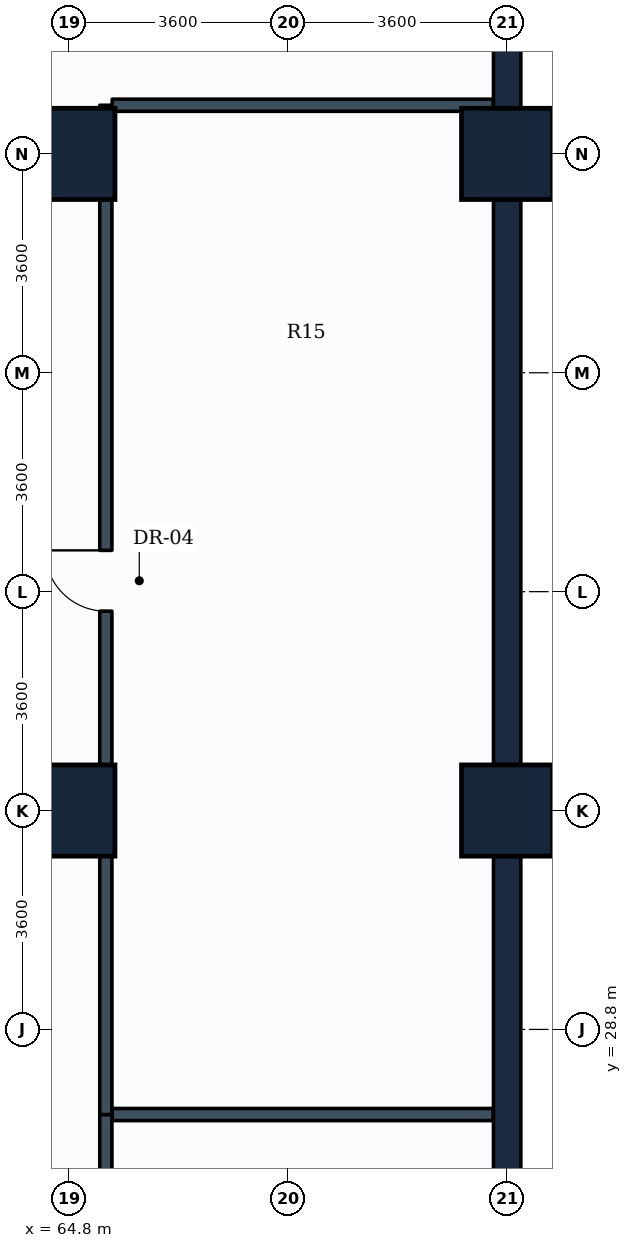
"""IFC4 building model, lengths in metres.
Left out: names, types, materials, properties, quantities, classifications, styles, units other than length and angle.
Written with IfcOpenShell. Run it as: python <this file> out.ifc"""

import sys

from ifc_helpers import new_model, si_unit, direction, frame, frame_2d, origin, origin_2d, place, context, subcontext, project, spatial, rectangle, extrude, element, fill, save


model = new_model("IFC4")
c1 = context("Model", 3, precision=1e-05, world=origin(), true_north=direction((0.0, 1.0)))
c2 = subcontext(c1, "Body", "Model", "MODEL_VIEW")
j1 = project(units=[si_unit("LENGTHUNIT", "METRE"), si_unit("PLANEANGLEUNIT", "RADIAN")], contexts=[c1])
p1 = place(None, origin())
s1 = spatial("IfcSite", under=j1, at=p1, CompositionType="ELEMENT")
p2 = place(p1, origin())
s2 = spatial("IfcBuilding", under=s1, at=p2, CompositionType="ELEMENT")
p3 = place(p2, frame((0.0, 0.0, -9.6)))
s3 = spatial("IfcBuildingStorey", under=s2, at=p3, CompositionType="ELEMENT", Elevation=-9.6)
for number, where, z_axis, x_axis in (
    (1, (64.8, 32.4, 0.0), (0.0, 0.0, 1.0), (1.0, 0.0, 0.0)),
    (2, (64.8, 43.2, 0.0), (0.0, 0.0, 1.0), (1.0, 0.0, 0.0)),
    (3, (72.0, 32.4, 0.0), (0.0, 0.0, 1.0), (1.0, 0.0, 0.0)),
    (4, (72.0, 43.2, 0.0), (0.0, 0.0, 1.0), (1.0, 0.0, 0.0)),
):
    element("IfcColumn", number, at=place(p3, frame(where, z_axis=z_axis, x_axis=x_axis)), inside=s3, PredefinedType="COLUMN", context=c2, shape_type="SweptSolid", body=[
        extrude(rectangle(XDim=1.5, YDim=1.5, at=origin_2d()), origin(), (0.0, 0.0, 1.0), 4.8),
    ])
p4 = place(p3, frame((72.0, 0.0, 0.0), z_axis=(0.0, 0.0, 1.0), x_axis=(0.0, 1.0, 0.0)))
e5 = element("IfcWall", 5, at=p4, inside=s3, PredefinedType="SOLIDWALL", context=c2, shape_type="SweptSolid", body=[
    extrude(rectangle(XDim=50.4, YDim=0.45, at=frame_2d((25.2, 0.0))), origin(), (0.0, 0.0, 1.0), 4.45),
])
p5 = place(p3, frame((65.4, 10.904, 0.0), z_axis=(0.0, 0.0, 1.0), x_axis=(0.0, 1.0, 0.0)))
e6 = element("IfcWall", 6, at=p5, inside=s3, PredefinedType="PARTITIONING", context=c2, shape_type="SweptSolid", body=[
    extrude(rectangle(XDim=16.496, YDim=0.2, at=frame_2d((8.248, 0.0))), origin(), (0.0, 0.0, 1.0), 3.63),
])
p6 = place(p5, frame((6.419, 0.0, 0.0)))
e7 = element("IfcOpeningElement", 7, at=p6, cuts=e6, PredefinedType="OPENING", context=c2, shape_type="SweptSolid", body=[
    extrude(rectangle(XDim=1.0, YDim=2.1, at=frame_2d((0.5, 1.05))), frame((0.0, 0.11, 0.0), z_axis=(0.0, -1.0, 0.0), x_axis=(1.0, 0.0, 0.0)), (0.0, 0.0, 1.0), 0.22),
])
p7 = place(p3, frame((65.4, 27.4, 0.0), z_axis=(0.0, 0.0, 1.0), x_axis=(0.0, 1.0, 0.0)))
e8 = element("IfcWall", 8, at=p7, inside=s3, PredefinedType="PARTITIONING", context=c2, shape_type="SweptSolid", body=[
    extrude(rectangle(XDim=16.6, YDim=0.2, at=frame_2d((8.3, 0.0))), origin(), (0.0, 0.0, 1.0), 3.63),
])
p8 = place(p7, frame((8.279, 0.0, 0.0)))
e9 = element("IfcOpeningElement", 9, at=p8, cuts=e8, PredefinedType="OPENING", context=c2, shape_type="SweptSolid", body=[
    extrude(rectangle(XDim=1.0, YDim=2.1, at=frame_2d((0.5, 1.05))), frame((0.0, 0.11, 0.0), z_axis=(0.0, -1.0, 0.0), x_axis=(1.0, 0.0, 0.0)), (0.0, 0.0, 1.0), 0.22),
])
for number, where, z_axis, x_axis in (
    (10, (65.504, 27.4, 0.0), (0.0, 0.0, 1.0), (1.0, 0.0, 0.0)),
    (11, (65.504, 44.0, 0.0), (0.0, 0.0, 1.0), (1.0, 0.0, 0.0)),
):
    element("IfcWall", number, at=place(p3, frame(where, z_axis=z_axis, x_axis=x_axis)), inside=s3, PredefinedType="PARTITIONING", context=c2, shape_type="SweptSolid", body=[
        extrude(rectangle(XDim=6.267, YDim=0.2, at=frame_2d((3.134, 0.0))), origin(), (0.0, 0.0, 1.0), 3.93),
    ])
p9 = place(p8, origin())
e12 = element("IfcDoor", 12, at=p9, inside=s3, OperationType="SINGLE_SWING_RIGHT", PredefinedType="DOOR", context=c2, shape_type="SweptSolid", body=[
    extrude(rectangle(XDim=1.0, YDim=2.1, at=frame_2d((0.5, 1.05))), frame((0.0, 0.025, 0.0), z_axis=(0.0, -1.0, 0.0), x_axis=(1.0, 0.0, 0.0)), (0.0, 0.0, 1.0), 0.05),
])
fill(e9, e12)
save(model, sys.argv[1])
